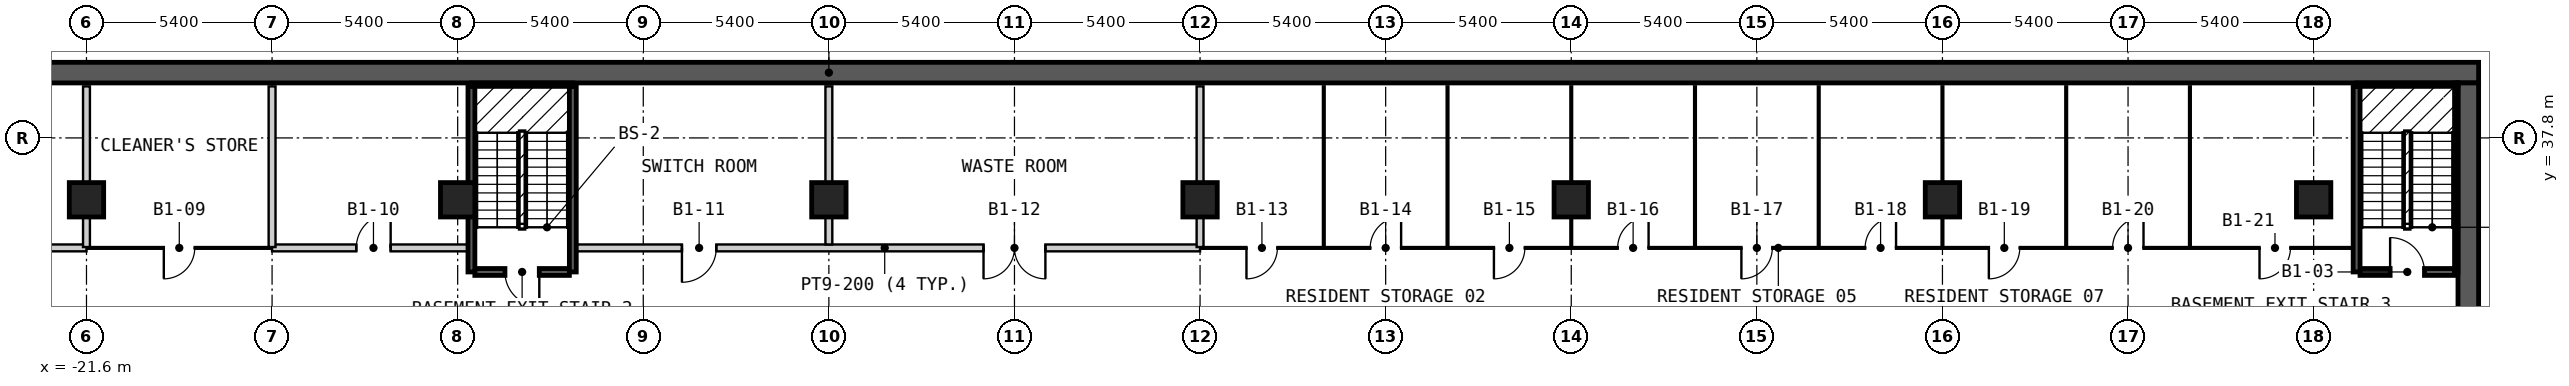
"""IFC4 building model, lengths in metres.
Left out: names, types, materials, properties, quantities, classifications, styles, units other than length and angle.
Written with IfcOpenShell. Run it as: python <this file> out.ifc"""

import sys

from ifc_helpers import new_model, si_unit, direction, frame, frame_2d, origin, origin_2d, place, context, subcontext, project, spatial, rectangle, extrude, element, fill, save


model = new_model("IFC4")
c1 = context("Model", 3, precision=1e-05, world=origin(), true_north=direction((0.0, 1.0)))
c2 = subcontext(c1, "Body", "Model", "MODEL_VIEW")
j1 = project(units=[si_unit("LENGTHUNIT", "METRE"), si_unit("PLANEANGLEUNIT", "RADIAN")], contexts=[c1])
p1 = place(None, origin())
s1 = spatial("IfcSite", under=j1, at=p1, CompositionType="ELEMENT")
p2 = place(p1, origin())
s2 = spatial("IfcBuilding", under=s1, at=p2, CompositionType="ELEMENT")
p3 = place(p2, frame((0.0, 0.0, -4.2)))
s3 = spatial("IfcBuildingStorey", under=s2, at=p3, CompositionType="ELEMENT", Elevation=-4.2)
p4 = place(p3, frame((-48.0, 39.7, 0.0), z_axis=(0.0, 0.0, 1.0), x_axis=(1.0, 0.0, 0.0)))
e1 = element("IfcWall", 1, at=p4, inside=s3, PredefinedType="SOLIDWALL", context=c2, shape_type="SweptSolid", body=[
    extrude(rectangle(XDim=96.0, YDim=0.6, at=frame_2d((48.0, 0.0))), origin(), (0.0, 0.0, 1.0), 4.2),
])
p5 = place(p3, frame((47.7, -31.4, 0.0), z_axis=(0.0, 0.0, 1.0), x_axis=(0.0, 1.0, 0.0)))
e2 = element("IfcWall", 2, at=p5, inside=s3, PredefinedType="SOLIDWALL", context=c2, shape_type="SweptSolid", body=[
    extrude(rectangle(XDim=70.8, YDim=0.6, at=frame_2d((35.4, 0.0))), origin(), (0.0, 0.0, 1.0), 4.2),
])
for number, where, z_axis, x_axis in (
    (3, (-21.6, 36.0, 0.0), (0.0, 0.0, 1.0), (1.0, 0.0, 0.0)),
    (4, (-10.8, 36.0, 0.0), (0.0, 0.0, 1.0), (1.0, 0.0, 0.0)),
    (5, (0.0, 36.0, 0.0), (0.0, 0.0, 1.0), (1.0, 0.0, 0.0)),
    (6, (10.8, 36.0, 0.0), (0.0, 0.0, 1.0), (1.0, 0.0, 0.0)),
    (7, (21.6, 36.0, 0.0), (0.0, 0.0, 1.0), (1.0, 0.0, 0.0)),
    (8, (32.4, 36.0, 0.0), (0.0, 0.0, 1.0), (1.0, 0.0, 0.0)),
    (9, (43.2, 36.0, 0.0), (0.0, 0.0, 1.0), (1.0, 0.0, 0.0)),
):
    element("IfcColumn", number, at=place(p3, frame(where, z_axis=z_axis, x_axis=x_axis)), inside=s3, PredefinedType="COLUMN", context=c2, shape_type="SweptSolid", body=[
        extrude(rectangle(XDim=1.0, YDim=1.0, at=origin_2d()), origin(), (0.0, 0.0, 1.0), 4.2),
    ])
p6 = place(p3, frame((-10.3, 33.9, 0.0), z_axis=(0.0, 0.0, 1.0), x_axis=(1.0, 0.0, 0.0)))
e10 = element("IfcWall", 10, at=p6, inside=s3, PredefinedType="SOLIDWALL", context=c2, shape_type="SweptSolid", body=[
    extrude(rectangle(XDim=2.75, YDim=0.2, at=frame_2d((1.375, 0.0))), origin(), (0.0, 0.0, 1.0), 3.75),
])
p7 = place(p6, frame((0.875, 0.0, 0.0)))
e11 = element("IfcOpeningElement", 11, at=p7, cuts=e10, PredefinedType="OPENING", context=c2, shape_type="SweptSolid", body=[
    extrude(rectangle(XDim=1.0, YDim=2.1, at=frame_2d((0.5, 1.05))), frame((0.0, 0.11, 0.0), z_axis=(0.0, -1.0, 0.0), x_axis=(1.0, 0.0, 0.0)), (0.0, 0.0, 1.0), 0.22),
])
p8 = place(p3, frame((44.55, 33.9, 0.0), z_axis=(0.0, 0.0, 1.0), x_axis=(1.0, 0.0, 0.0)))
e12 = element("IfcWall", 12, at=p8, inside=s3, PredefinedType="SOLIDWALL", context=c2, shape_type="SweptSolid", body=[
    extrude(rectangle(XDim=2.75, YDim=0.2, at=frame_2d((1.375, 0.0))), origin(), (0.0, 0.0, 1.0), 3.75),
])
p9 = place(p8, frame((0.875, 0.0, 0.0)))
e13 = element("IfcOpeningElement", 13, at=p9, cuts=e12, PredefinedType="OPENING", context=c2, shape_type="SweptSolid", body=[
    extrude(rectangle(XDim=1.0, YDim=2.1, at=frame_2d((0.5, 1.05))), frame((0.0, 0.11, 0.0), z_axis=(0.0, -1.0, 0.0), x_axis=(1.0, 0.0, 0.0)), (0.0, 0.0, 1.0), 0.22),
])
p10 = place(p3, frame((-21.6, 34.6, 0.0), z_axis=(0.0, 0.0, 1.0), x_axis=(1.0, 0.0, 0.0)))
e14 = element("IfcWall", 14, at=p10, inside=s3, PredefinedType="PARTITIONING", context=c2, shape_type="SweptSolid", body=[
    extrude(rectangle(XDim=5.5, YDim=0.05, at=frame_2d((2.75, 0.0))), origin(), (0.0, 0.0, 1.0), 3.75),
])
p11 = place(p10, frame((3.15, 0.0, 0.0), z_axis=(0.0, 0.0, 1.0), x_axis=(-1.0, 0.0, 0.0)))
e15 = element("IfcOpeningElement", 15, at=p11, cuts=e14, PredefinedType="OPENING", context=c2, shape_type="SweptSolid", body=[
    extrude(rectangle(XDim=0.9, YDim=2.1, at=frame_2d((0.45, 1.05))), frame((0.0, 0.035, 0.0), z_axis=(0.0, -1.0, 0.0), x_axis=(1.0, 0.0, 0.0)), (0.0, 0.0, 1.0), 0.07),
])
p12 = place(p3, frame((10.8, 34.6, 0.0), z_axis=(0.0, 0.0, 1.0), x_axis=(1.0, 0.0, 0.0)))
e16 = element("IfcWall", 16, at=p12, inside=s3, PredefinedType="PARTITIONING", context=c2, shape_type="SweptSolid", body=[
    extrude(rectangle(XDim=33.65, YDim=0.05, at=frame_2d((16.825, 0.0))), origin(), (0.0, 0.0, 1.0), 3.75),
])
p13 = place(p12, frame((2.25, 0.0, 0.0), z_axis=(0.0, 0.0, 1.0), x_axis=(-1.0, 0.0, 0.0)))
e17 = element("IfcOpeningElement", 17, at=p13, cuts=e16, PredefinedType="OPENING", context=c2, shape_type="SweptSolid", body=[
    extrude(rectangle(XDim=0.9, YDim=2.1, at=frame_2d((0.45, 1.05))), frame((0.0, 0.035, 0.0), z_axis=(0.0, -1.0, 0.0), x_axis=(1.0, 0.0, 0.0)), (0.0, 0.0, 1.0), 0.07),
])
p14 = place(p12, frame((5.85, 0.0, 0.0), z_axis=(0.0, 0.0, 1.0), x_axis=(-1.0, 0.0, 0.0)))
e18 = element("IfcOpeningElement", 18, at=p14, cuts=e16, PredefinedType="OPENING", context=c2, shape_type="SweptSolid", body=[
    extrude(rectangle(XDim=0.9, YDim=2.1, at=frame_2d((0.45, 1.05))), frame((0.0, 0.035, 0.0), z_axis=(0.0, -1.0, 0.0), x_axis=(1.0, 0.0, 0.0)), (0.0, 0.0, 1.0), 0.07),
])
p15 = place(p12, frame((9.45, 0.0, 0.0), z_axis=(0.0, 0.0, 1.0), x_axis=(-1.0, 0.0, 0.0)))
e19 = element("IfcOpeningElement", 19, at=p15, cuts=e16, PredefinedType="OPENING", context=c2, shape_type="SweptSolid", body=[
    extrude(rectangle(XDim=0.9, YDim=2.1, at=frame_2d((0.45, 1.05))), frame((0.0, 0.035, 0.0), z_axis=(0.0, -1.0, 0.0), x_axis=(1.0, 0.0, 0.0)), (0.0, 0.0, 1.0), 0.07),
])
p16 = place(p12, frame((13.05, 0.0, 0.0), z_axis=(0.0, 0.0, 1.0), x_axis=(-1.0, 0.0, 0.0)))
e20 = element("IfcOpeningElement", 20, at=p16, cuts=e16, PredefinedType="OPENING", context=c2, shape_type="SweptSolid", body=[
    extrude(rectangle(XDim=0.9, YDim=2.1, at=frame_2d((0.45, 1.05))), frame((0.0, 0.035, 0.0), z_axis=(0.0, -1.0, 0.0), x_axis=(1.0, 0.0, 0.0)), (0.0, 0.0, 1.0), 0.07),
])
p17 = place(p12, frame((16.65, 0.0, 0.0), z_axis=(0.0, 0.0, 1.0), x_axis=(-1.0, 0.0, 0.0)))
e21 = element("IfcOpeningElement", 21, at=p17, cuts=e16, PredefinedType="OPENING", context=c2, shape_type="SweptSolid", body=[
    extrude(rectangle(XDim=0.9, YDim=2.1, at=frame_2d((0.45, 1.05))), frame((0.0, 0.035, 0.0), z_axis=(0.0, -1.0, 0.0), x_axis=(1.0, 0.0, 0.0)), (0.0, 0.0, 1.0), 0.07),
])
p18 = place(p12, frame((20.25, 0.0, 0.0), z_axis=(0.0, 0.0, 1.0), x_axis=(-1.0, 0.0, 0.0)))
e22 = element("IfcOpeningElement", 22, at=p18, cuts=e16, PredefinedType="OPENING", context=c2, shape_type="SweptSolid", body=[
    extrude(rectangle(XDim=0.9, YDim=2.1, at=frame_2d((0.45, 1.05))), frame((0.0, 0.035, 0.0), z_axis=(0.0, -1.0, 0.0), x_axis=(1.0, 0.0, 0.0)), (0.0, 0.0, 1.0), 0.07),
])
p19 = place(p12, frame((23.85, 0.0, 0.0), z_axis=(0.0, 0.0, 1.0), x_axis=(-1.0, 0.0, 0.0)))
e23 = element("IfcOpeningElement", 23, at=p19, cuts=e16, PredefinedType="OPENING", context=c2, shape_type="SweptSolid", body=[
    extrude(rectangle(XDim=0.9, YDim=2.1, at=frame_2d((0.45, 1.05))), frame((0.0, 0.035, 0.0), z_axis=(0.0, -1.0, 0.0), x_axis=(1.0, 0.0, 0.0)), (0.0, 0.0, 1.0), 0.07),
])
p20 = place(p12, frame((27.45, 0.0, 0.0), z_axis=(0.0, 0.0, 1.0), x_axis=(-1.0, 0.0, 0.0)))
e24 = element("IfcOpeningElement", 24, at=p20, cuts=e16, PredefinedType="OPENING", context=c2, shape_type="SweptSolid", body=[
    extrude(rectangle(XDim=0.9, YDim=2.1, at=frame_2d((0.45, 1.05))), frame((0.0, 0.035, 0.0), z_axis=(0.0, -1.0, 0.0), x_axis=(1.0, 0.0, 0.0)), (0.0, 0.0, 1.0), 0.07),
])
p21 = place(p12, frame((31.725, 0.0, 0.0), z_axis=(0.0, 0.0, 1.0), x_axis=(-1.0, 0.0, 0.0)))
e25 = element("IfcOpeningElement", 25, at=p21, cuts=e16, PredefinedType="OPENING", context=c2, shape_type="SweptSolid", body=[
    extrude(rectangle(XDim=0.9, YDim=2.1, at=frame_2d((0.45, 1.05))), frame((0.0, 0.035, 0.0), z_axis=(0.0, -1.0, 0.0), x_axis=(1.0, 0.0, 0.0)), (0.0, 0.0, 1.0), 0.07),
])
p22 = place(p3, frame((-44.55, 34.6, 0.0), z_axis=(0.0, 0.0, 1.0), x_axis=(1.0, 0.0, 0.0)))
e26 = element("IfcWall", 26, at=p22, inside=s3, PredefinedType="PARTITIONING", context=c2, shape_type="SweptSolid", body=[
    extrude(rectangle(XDim=22.95, YDim=0.2, at=frame_2d((11.475, 0.0))), origin(), (0.0, 0.0, 1.0), 3.75),
])
p23 = place(p22, frame((11.342, 0.0, 0.0), z_axis=(0.0, 0.0, 1.0), x_axis=(-1.0, 0.0, 0.0)))
e27 = element("IfcOpeningElement", 27, at=p23, cuts=e26, PredefinedType="OPENING", context=c2, shape_type="SweptSolid", body=[
    extrude(rectangle(XDim=1.8, YDim=2.1, at=frame_2d((0.9, 1.05))), frame((0.0, 0.11, 0.0), z_axis=(0.0, -1.0, 0.0), x_axis=(1.0, 0.0, 0.0)), (0.0, 0.0, 1.0), 0.22),
])
p24 = place(p3, frame((-16.2, 34.6, 0.0), z_axis=(0.0, 0.0, 1.0), x_axis=(1.0, 0.0, 0.0)))
e28 = element("IfcWall", 28, at=p24, inside=s3, PredefinedType="SOLIDWALL", context=c2, shape_type="SweptSolid", body=[
    extrude(rectangle(XDim=5.9, YDim=0.2, at=frame_2d((2.95, 0.0))), origin(), (0.0, 0.0, 1.0), 3.75),
])
p25 = place(p24, frame((3.45, 0.0, 0.0), z_axis=(0.0, 0.0, 1.0), x_axis=(-1.0, 0.0, 0.0)))
e29 = element("IfcOpeningElement", 29, at=p25, cuts=e28, PredefinedType="OPENING", context=c2, shape_type="SweptSolid", body=[
    extrude(rectangle(XDim=1.0, YDim=2.1, at=frame_2d((0.5, 1.05))), frame((0.0, 0.11, 0.0), z_axis=(0.0, -1.0, 0.0), x_axis=(1.0, 0.0, 0.0)), (0.0, 0.0, 1.0), 0.22),
])
p26 = place(p3, frame((-7.55, 34.6, 0.0), z_axis=(0.0, 0.0, 1.0), x_axis=(1.0, 0.0, 0.0)))
e30 = element("IfcWall", 30, at=p26, inside=s3, PredefinedType="SOLIDWALL", context=c2, shape_type="SweptSolid", body=[
    extrude(rectangle(XDim=18.35, YDim=0.2, at=frame_2d((9.175, 0.0))), origin(), (0.0, 0.0, 1.0), 3.75),
])
p27 = place(p26, frame((4.275, 0.0, 0.0), z_axis=(0.0, 0.0, 1.0), x_axis=(-1.0, 0.0, 0.0)))
e31 = element("IfcOpeningElement", 31, at=p27, cuts=e30, PredefinedType="OPENING", context=c2, shape_type="SweptSolid", body=[
    extrude(rectangle(XDim=1.0, YDim=2.1, at=frame_2d((0.5, 1.05))), frame((0.0, 0.11, 0.0), z_axis=(0.0, -1.0, 0.0), x_axis=(1.0, 0.0, 0.0)), (0.0, 0.0, 1.0), 0.22),
])
p28 = place(p26, frame((13.85, 0.0, 0.0), z_axis=(0.0, 0.0, 1.0), x_axis=(-1.0, 0.0, 0.0)))
e32 = element("IfcOpeningElement", 32, at=p28, cuts=e30, PredefinedType="OPENING", context=c2, shape_type="SweptSolid", body=[
    extrude(rectangle(XDim=1.8, YDim=2.1, at=frame_2d((0.9, 1.05))), frame((0.0, 0.11, 0.0), z_axis=(0.0, -1.0, 0.0), x_axis=(1.0, 0.0, 0.0)), (0.0, 0.0, 1.0), 0.22),
])
p29 = place(p3, frame((-21.6, 34.625, 0.0), z_axis=(0.0, 0.0, 1.0), x_axis=(0.0, 1.0, 0.0)))
e33 = element("IfcWall", 33, at=p29, inside=s3, PredefinedType="PARTITIONING", context=c2, shape_type="SweptSolid", body=[
    extrude(rectangle(XDim=4.675, YDim=0.2, at=frame_2d((2.337, 0.0))), origin(), (0.0, 0.0, 1.0), 3.75),
])
p30 = place(p3, frame((-16.2, 34.625, 0.0), z_axis=(0.0, 0.0, 1.0), x_axis=(0.0, 1.0, 0.0)))
e34 = element("IfcWall", 34, at=p30, inside=s3, PredefinedType="SOLIDWALL", context=c2, shape_type="SweptSolid", body=[
    extrude(rectangle(XDim=4.675, YDim=0.2, at=frame_2d((2.337, 0.0))), origin(), (0.0, 0.0, 1.0), 3.75),
])
for number, where, z_axis, x_axis in (
    (35, (-10.4, 33.9, 0.0), (0.0, 0.0, 1.0), (0.0, 1.0, 0.0)),
    (36, (-7.45, 33.9, 0.0), (0.0, 0.0, 1.0), (0.0, 1.0, 0.0)),
):
    element("IfcWall", number, at=place(p3, frame(where, z_axis=z_axis, x_axis=x_axis)), inside=s3, PredefinedType="SOLIDWALL", context=c2, shape_type="SweptSolid", body=[
        extrude(rectangle(XDim=5.4, YDim=0.2, at=frame_2d((2.7, 0.0))), origin(), (0.0, 0.0, 1.0), 3.75),
    ])
p31 = place(p3, frame((0.0, 34.7, 0.0), z_axis=(0.0, 0.0, 1.0), x_axis=(0.0, 1.0, 0.0)))
e37 = element("IfcWall", 37, at=p31, inside=s3, PredefinedType="SOLIDWALL", context=c2, shape_type="SweptSolid", body=[
    extrude(rectangle(XDim=4.6, YDim=0.2, at=frame_2d((2.3, 0.0))), origin(), (0.0, 0.0, 1.0), 3.75),
])
p32 = place(p3, frame((10.8, 34.625, 0.0), z_axis=(0.0, 0.0, 1.0), x_axis=(0.0, 1.0, 0.0)))
e38 = element("IfcWall", 38, at=p32, inside=s3, PredefinedType="PARTITIONING", context=c2, shape_type="SweptSolid", body=[
    extrude(rectangle(XDim=4.675, YDim=0.2, at=frame_2d((2.337, 0.0))), origin(), (0.0, 0.0, 1.0), 3.75),
])
for number, where, z_axis, x_axis in (
    (39, (14.4, 34.625, 0.0), (0.0, 0.0, 1.0), (0.0, 1.0, 0.0)),
    (40, (18.0, 34.625, 0.0), (0.0, 0.0, 1.0), (0.0, 1.0, 0.0)),
    (41, (21.6, 34.625, 0.0), (0.0, 0.0, 1.0), (0.0, 1.0, 0.0)),
    (42, (25.2, 34.625, 0.0), (0.0, 0.0, 1.0), (0.0, 1.0, 0.0)),
    (43, (28.8, 34.625, 0.0), (0.0, 0.0, 1.0), (0.0, 1.0, 0.0)),
    (44, (32.4, 34.625, 0.0), (0.0, 0.0, 1.0), (0.0, 1.0, 0.0)),
    (45, (36.0, 34.625, 0.0), (0.0, 0.0, 1.0), (0.0, 1.0, 0.0)),
    (46, (39.6, 34.625, 0.0), (0.0, 0.0, 1.0), (0.0, 1.0, 0.0)),
):
    element("IfcWall", number, at=place(p3, frame(where, z_axis=z_axis, x_axis=x_axis)), inside=s3, PredefinedType="PARTITIONING", context=c2, shape_type="SweptSolid", body=[
        extrude(rectangle(XDim=4.675, YDim=0.05, at=frame_2d((2.337, 0.0))), origin(), (0.0, 0.0, 1.0), 3.75),
    ])
p33 = place(p3, frame((44.45, 33.9, 0.0), z_axis=(0.0, 0.0, 1.0), x_axis=(0.0, 1.0, 0.0)))
e47 = element("IfcWall", 47, at=p33, inside=s3, PredefinedType="SOLIDWALL", context=c2, shape_type="SweptSolid", body=[
    extrude(rectangle(XDim=5.4, YDim=0.2, at=frame_2d((2.7, 0.0))), origin(), (0.0, 0.0, 1.0), 3.75),
])
p34 = place(p3, frame((-10.4, 39.35, 0.0), z_axis=(0.0, 0.0, 1.0), x_axis=(1.0, 0.0, 0.0)))
e48 = element("IfcWall", 48, at=p34, inside=s3, PredefinedType="SOLIDWALL", context=c2, shape_type="SweptSolid", body=[
    extrude(rectangle(XDim=2.95, YDim=0.1, at=frame_2d((1.475, 0.0))), origin(), (0.0, 0.0, 1.0), 3.75),
])
p35 = place(p3, frame((47.35, 33.9, 0.0), z_axis=(0.0, 0.0, 1.0), x_axis=(0.0, 1.0, 0.0)))
e49 = element("IfcWall", 49, at=p35, inside=s3, PredefinedType="SOLIDWALL", context=c2, shape_type="SweptSolid", body=[
    extrude(rectangle(XDim=5.5, YDim=0.1, at=frame_2d((2.75, 0.0))), origin(), (0.0, 0.0, 1.0), 3.75),
])
p36 = place(p3, frame((44.45, 39.35, 0.0), z_axis=(0.0, 0.0, 1.0), x_axis=(1.0, 0.0, 0.0)))
e50 = element("IfcWall", 50, at=p36, inside=s3, PredefinedType="SOLIDWALL", context=c2, shape_type="SweptSolid", body=[
    extrude(rectangle(XDim=2.95, YDim=0.1, at=frame_2d((1.475, 0.0))), origin(), (0.0, 0.0, 1.0), 3.75),
])
p37 = place(p7, origin())
e51 = element("IfcDoor", 51, at=p37, inside=s3, OperationType="SINGLE_SWING_RIGHT", PredefinedType="DOOR", context=c2, shape_type="SweptSolid", body=[
    extrude(rectangle(XDim=1.0, YDim=2.1, at=frame_2d((0.5, 1.05))), frame((0.0, 0.025, 0.0), z_axis=(0.0, -1.0, 0.0), x_axis=(1.0, 0.0, 0.0)), (0.0, 0.0, 1.0), 0.05),
])
fill(e11, e51)
p38 = place(p9, origin())
e52 = element("IfcDoor", 52, at=p38, inside=s3, OperationType="SINGLE_SWING_LEFT", PredefinedType="DOOR", context=c2, shape_type="SweptSolid", body=[
    extrude(rectangle(XDim=1.0, YDim=2.1, at=frame_2d((0.5, 1.05))), frame((0.0, 0.025, 0.0), z_axis=(0.0, -1.0, 0.0), x_axis=(1.0, 0.0, 0.0)), (0.0, 0.0, 1.0), 0.05),
])
fill(e13, e52)
p39 = place(p11, origin())
e53 = element("IfcDoor", 53, at=p39, inside=s3, OperationType="SINGLE_SWING_RIGHT", PredefinedType="DOOR", context=c2, shape_type="SweptSolid", body=[
    extrude(rectangle(XDim=0.9, YDim=2.1, at=frame_2d((0.45, 1.05))), frame((0.0, 0.025, 0.0), z_axis=(0.0, -1.0, 0.0), x_axis=(1.0, 0.0, 0.0)), (0.0, 0.0, 1.0), 0.05),
])
fill(e15, e53)
p40 = place(p25, origin())
e54 = element("IfcDoor", 54, at=p40, inside=s3, OperationType="SINGLE_SWING_LEFT", PredefinedType="DOOR", context=c2, shape_type="SweptSolid", body=[
    extrude(rectangle(XDim=1.0, YDim=2.1, at=frame_2d((0.5, 1.05))), frame((0.0, 0.025, 0.0), z_axis=(0.0, -1.0, 0.0), x_axis=(1.0, 0.0, 0.0)), (0.0, 0.0, 1.0), 0.05),
])
fill(e29, e54)
p41 = place(p27, origin())
e55 = element("IfcDoor", 55, at=p41, inside=s3, OperationType="SINGLE_SWING_RIGHT", PredefinedType="DOOR", context=c2, shape_type="SweptSolid", body=[
    extrude(rectangle(XDim=1.0, YDim=2.1, at=frame_2d((0.5, 1.05))), frame((0.0, 0.025, 0.0), z_axis=(0.0, -1.0, 0.0), x_axis=(1.0, 0.0, 0.0)), (0.0, 0.0, 1.0), 0.05),
])
fill(e31, e55)
p42 = place(p28, origin())
e56 = element("IfcDoor", 56, at=p42, inside=s3, OperationType="DOUBLE_DOOR_SINGLE_SWING", PredefinedType="DOOR", context=c2, shape_type="SweptSolid", body=[
    extrude(rectangle(XDim=1.8, YDim=2.1, at=frame_2d((0.9, 1.05))), frame((0.0, 0.025, 0.0), z_axis=(0.0, -1.0, 0.0), x_axis=(1.0, 0.0, 0.0)), (0.0, 0.0, 1.0), 0.05),
])
fill(e32, e56)
p43 = place(p13, origin())
e57 = element("IfcDoor", 57, at=p43, inside=s3, OperationType="SINGLE_SWING_RIGHT", PredefinedType="DOOR", context=c2, shape_type="SweptSolid", body=[
    extrude(rectangle(XDim=0.9, YDim=2.1, at=frame_2d((0.45, 1.05))), frame((0.0, 0.025, 0.0), z_axis=(0.0, -1.0, 0.0), x_axis=(1.0, 0.0, 0.0)), (0.0, 0.0, 1.0), 0.05),
])
fill(e17, e57)
p44 = place(p14, origin())
e58 = element("IfcDoor", 58, at=p44, inside=s3, OperationType="SINGLE_SWING_LEFT", PredefinedType="DOOR", context=c2, shape_type="SweptSolid", body=[
    extrude(rectangle(XDim=0.9, YDim=2.1, at=frame_2d((0.45, 1.05))), frame((0.0, 0.025, 0.0), z_axis=(0.0, -1.0, 0.0), x_axis=(1.0, 0.0, 0.0)), (0.0, 0.0, 1.0), 0.05),
])
fill(e18, e58)
p45 = place(p15, origin())
e59 = element("IfcDoor", 59, at=p45, inside=s3, OperationType="SINGLE_SWING_RIGHT", PredefinedType="DOOR", context=c2, shape_type="SweptSolid", body=[
    extrude(rectangle(XDim=0.9, YDim=2.1, at=frame_2d((0.45, 1.05))), frame((0.0, 0.025, 0.0), z_axis=(0.0, -1.0, 0.0), x_axis=(1.0, 0.0, 0.0)), (0.0, 0.0, 1.0), 0.05),
])
fill(e19, e59)
p46 = place(p16, origin())
e60 = element("IfcDoor", 60, at=p46, inside=s3, OperationType="SINGLE_SWING_LEFT", PredefinedType="DOOR", context=c2, shape_type="SweptSolid", body=[
    extrude(rectangle(XDim=0.9, YDim=2.1, at=frame_2d((0.45, 1.05))), frame((0.0, 0.025, 0.0), z_axis=(0.0, -1.0, 0.0), x_axis=(1.0, 0.0, 0.0)), (0.0, 0.0, 1.0), 0.05),
])
fill(e20, e60)
p47 = place(p17, origin())
e61 = element("IfcDoor", 61, at=p47, inside=s3, OperationType="SINGLE_SWING_RIGHT", PredefinedType="DOOR", context=c2, shape_type="SweptSolid", body=[
    extrude(rectangle(XDim=0.9, YDim=2.1, at=frame_2d((0.45, 1.05))), frame((0.0, 0.025, 0.0), z_axis=(0.0, -1.0, 0.0), x_axis=(1.0, 0.0, 0.0)), (0.0, 0.0, 1.0), 0.05),
])
fill(e21, e61)
p48 = place(p18, origin())
e62 = element("IfcDoor", 62, at=p48, inside=s3, OperationType="SINGLE_SWING_LEFT", PredefinedType="DOOR", context=c2, shape_type="SweptSolid", body=[
    extrude(rectangle(XDim=0.9, YDim=2.1, at=frame_2d((0.45, 1.05))), frame((0.0, 0.025, 0.0), z_axis=(0.0, -1.0, 0.0), x_axis=(1.0, 0.0, 0.0)), (0.0, 0.0, 1.0), 0.05),
])
fill(e22, e62)
p49 = place(p19, origin())
e63 = element("IfcDoor", 63, at=p49, inside=s3, OperationType="SINGLE_SWING_RIGHT", PredefinedType="DOOR", context=c2, shape_type="SweptSolid", body=[
    extrude(rectangle(XDim=0.9, YDim=2.1, at=frame_2d((0.45, 1.05))), frame((0.0, 0.025, 0.0), z_axis=(0.0, -1.0, 0.0), x_axis=(1.0, 0.0, 0.0)), (0.0, 0.0, 1.0), 0.05),
])
fill(e23, e63)
p50 = place(p20, origin())
e64 = element("IfcDoor", 64, at=p50, inside=s3, OperationType="SINGLE_SWING_LEFT", PredefinedType="DOOR", context=c2, shape_type="SweptSolid", body=[
    extrude(rectangle(XDim=0.9, YDim=2.1, at=frame_2d((0.45, 1.05))), frame((0.0, 0.025, 0.0), z_axis=(0.0, -1.0, 0.0), x_axis=(1.0, 0.0, 0.0)), (0.0, 0.0, 1.0), 0.05),
])
fill(e24, e64)
p51 = place(p21, origin())
e65 = element("IfcDoor", 65, at=p51, inside=s3, OperationType="SINGLE_SWING_RIGHT", PredefinedType="DOOR", context=c2, shape_type="SweptSolid", body=[
    extrude(rectangle(XDim=0.9, YDim=2.1, at=frame_2d((0.45, 1.05))), frame((0.0, 0.025, 0.0), z_axis=(0.0, -1.0, 0.0), x_axis=(1.0, 0.0, 0.0)), (0.0, 0.0, 1.0), 0.05),
])
fill(e25, e65)
save(model, sys.argv[1])
